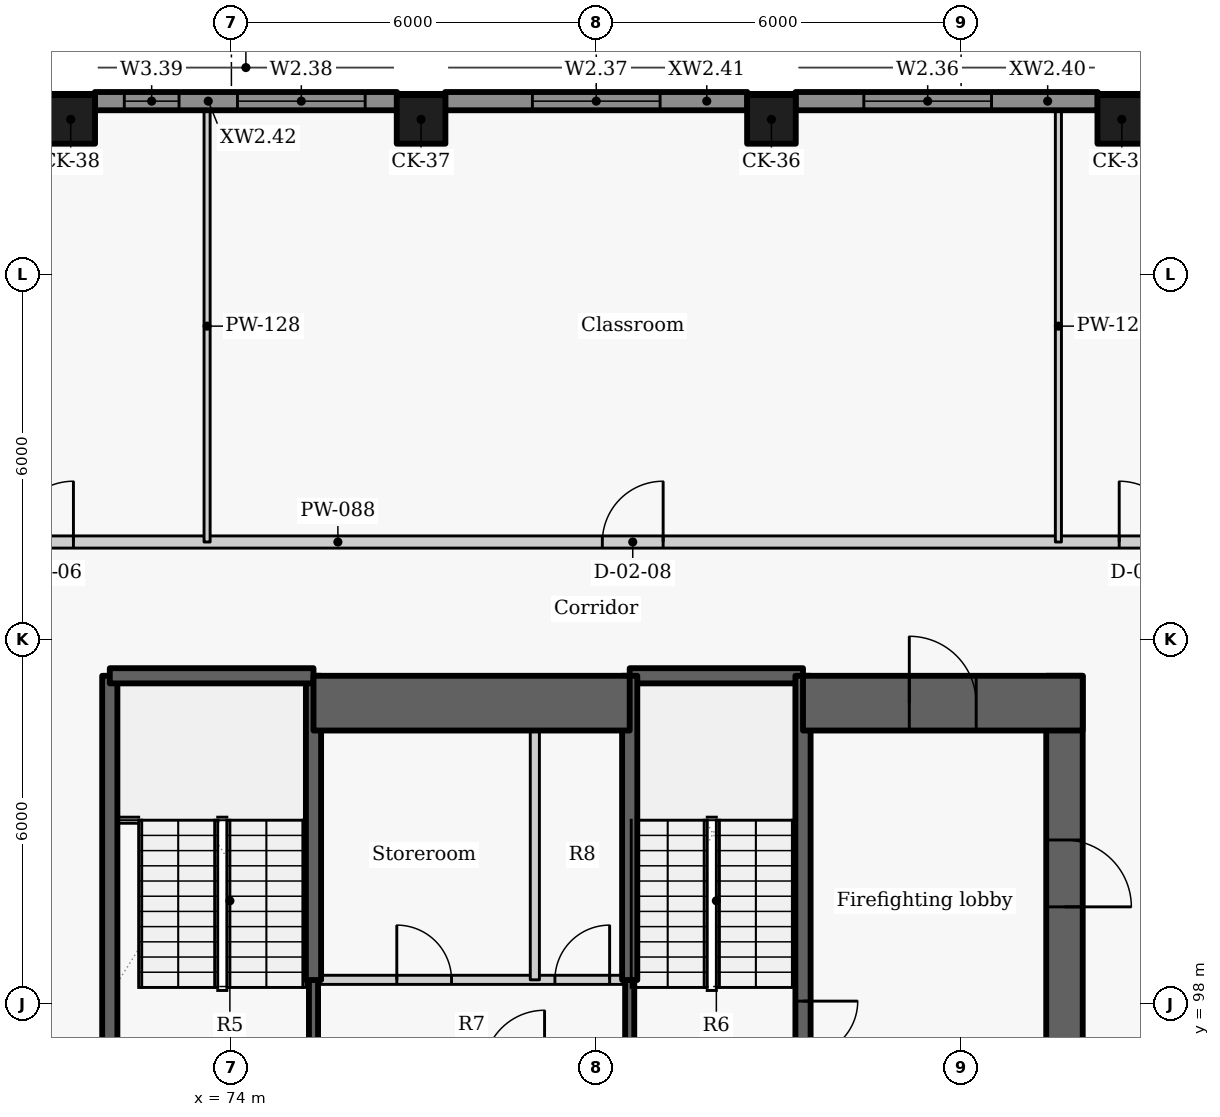
"""IFC4 building model, lengths in metres.
Left out: names, types, materials, properties, quantities, classifications, styles, units other than length and angle.
Written with IfcOpenShell. Run it as: python <this file> out.ifc"""

import sys

from ifc_helpers import new_model, si_unit, direction, frame, frame_2d, origin, origin_2d, place, context, subcontext, project, spatial, rectangle, extrude, element, fill, save


model = new_model("IFC4")
c1 = context("Model", 3, precision=1e-05, world=origin(), true_north=direction((0.0, 1.0)))
c2 = subcontext(c1, "Body", "Model", "MODEL_VIEW")
j1 = project(units=[si_unit("LENGTHUNIT", "METRE"), si_unit("PLANEANGLEUNIT", "RADIAN")], contexts=[c1])
p1 = place(None, origin())
s1 = spatial("IfcSite", under=j1, at=p1, CompositionType="ELEMENT")
p2 = place(p1, origin())
s2 = spatial("IfcBuilding", under=s1, at=p2, CompositionType="ELEMENT")
p3 = place(p2, frame((0.0, 0.0, 19.8)))
s3 = spatial("IfcBuildingStorey", under=s2, at=p3, CompositionType="ELEMENT", Elevation=19.8)
for number, where, z_axis, x_axis in (
    (1, (88.643, 112.55, 0.0), (0.0, 0.0, 1.0), (-1.0, 0.0, 0.0)),
    (2, (82.881, 112.55, 0.0), (0.0, 0.0, 1.0), (-1.0, 0.0, 0.0)),
    (3, (77.119, 112.55, 0.0), (0.0, 0.0, 1.0), (-1.0, 0.0, 0.0)),
    (4, (71.357, 112.55, 0.0), (0.0, 0.0, 1.0), (-1.0, 0.0, 0.0)),
):
    element("IfcColumn", number, at=place(p3, frame(where, z_axis=z_axis, x_axis=x_axis)), inside=s3, PredefinedType="COLUMN", context=c2, shape_type="SweptSolid", body=[
        extrude(rectangle(XDim=0.8, YDim=0.8, at=origin_2d()), origin(), (0.0, 0.0, 1.0), 4.2),
    ])
p4 = place(p3, frame((88.247, 112.85, 0.0), z_axis=(0.0, 0.0, 1.0), x_axis=(-1.0, 0.0, 0.0)))
e5 = element("IfcWall", 5, at=p4, inside=s3, PredefinedType="SOLIDWALL", context=c2, shape_type="SweptSolid", body=[
    extrude(rectangle(XDim=4.97, YDim=0.3, at=frame_2d((2.485, 0.0))), origin(), (0.0, 0.0, 1.0), 3.0),
])
p5 = place(p4, frame((1.746, 0.0, 0.9)))
e6 = element("IfcOpeningElement", 6, at=p5, cuts=e5, PredefinedType="OPENING", context=c2, shape_type="SweptSolid", body=[
    extrude(rectangle(XDim=2.1, YDim=2.05, at=frame_2d((1.05, 1.025))), frame((0.0, 0.16, 0.0), z_axis=(0.0, -1.0, 0.0), x_axis=(1.0, 0.0, 0.0)), (0.0, 0.0, 1.0), 0.32),
])
p6 = place(p3, frame((82.485, 112.85, 0.0), z_axis=(0.0, 0.0, 1.0), x_axis=(-1.0, 0.0, 0.0)))
e7 = element("IfcWall", 7, at=p6, inside=s3, PredefinedType="SOLIDWALL", context=c2, shape_type="SweptSolid", body=[
    extrude(rectangle(XDim=4.97, YDim=0.3, at=frame_2d((2.485, 0.0))), origin(), (0.0, 0.0, 1.0), 3.0),
])
p7 = place(p6, frame((1.435, 0.0, 0.9)))
e8 = element("IfcOpeningElement", 8, at=p7, cuts=e7, PredefinedType="OPENING", context=c2, shape_type="SweptSolid", body=[
    extrude(rectangle(XDim=2.1, YDim=2.05, at=frame_2d((1.05, 1.025))), frame((0.0, 0.16, 0.0), z_axis=(0.0, -1.0, 0.0), x_axis=(1.0, 0.0, 0.0)), (0.0, 0.0, 1.0), 0.32),
])
p8 = place(p3, frame((76.723, 112.85, 0.0), z_axis=(0.0, 0.0, 1.0), x_axis=(-1.0, 0.0, 0.0)))
e9 = element("IfcWall", 9, at=p8, inside=s3, PredefinedType="SOLIDWALL", context=c2, shape_type="SweptSolid", body=[
    extrude(rectangle(XDim=4.97, YDim=0.3, at=frame_2d((2.485, 0.0))), origin(), (0.0, 0.0, 1.0), 3.0),
])
p9 = place(p8, frame((0.523, 0.0, 0.9)))
e10 = element("IfcOpeningElement", 10, at=p9, cuts=e9, PredefinedType="OPENING", context=c2, shape_type="SweptSolid", body=[
    extrude(rectangle(XDim=2.1, YDim=2.05, at=frame_2d((1.05, 1.025))), frame((0.0, 0.16, 0.0), z_axis=(0.0, -1.0, 0.0), x_axis=(1.0, 0.0, 0.0)), (0.0, 0.0, 1.0), 0.32),
])
p10 = place(p8, frame((3.584, 0.0, 1.5)))
e11 = element("IfcOpeningElement", 11, at=p10, cuts=e9, PredefinedType="OPENING", context=c2, shape_type="SweptSolid", body=[
    extrude(rectangle(XDim=0.9, YDim=1.45, at=frame_2d((0.45, 0.725))), frame((0.0, 0.16, 0.0), z_axis=(0.0, -1.0, 0.0), x_axis=(1.0, 0.0, 0.0)), (0.0, 0.0, 1.0), 0.32),
])
p11 = place(p3, frame((87.7, 103.4, -0.3), z_axis=(0.0, 0.0, 1.0), x_axis=(0.0, -1.0, 0.0)))
e12 = element("IfcWall", 12, at=p11, inside=s3, PredefinedType="SHEAR", context=c2, shape_type="SweptSolid", body=[
    extrude(rectangle(XDim=15.6, YDim=0.6, at=frame_2d((7.8, 0.0))), origin(), (0.0, 0.0, 1.0), 4.2),
])
p12 = place(p11, frame((2.7, 0.0, 0.3)))
e13 = element("IfcOpeningElement", 13, at=p12, cuts=e12, PredefinedType="OPENING", context=c2, shape_type="SweptSolid", body=[
    extrude(rectangle(XDim=1.1, YDim=2.1, at=frame_2d((0.55, 1.05))), frame((0.0, 0.31, 0.0), z_axis=(0.0, -1.0, 0.0), x_axis=(1.0, 0.0, 0.0)), (0.0, 0.0, 1.0), 0.62),
])
p13 = place(p3, frame((75.35, 96.9, -0.3), z_axis=(0.0, 0.0, 1.0), x_axis=(0.0, 1.0, 0.0)))
e14 = element("IfcWall", 14, at=p13, inside=s3, PredefinedType="SHEAR", context=c2, shape_type="SweptSolid", body=[
    extrude(rectangle(XDim=1.503, YDim=0.15, at=frame_2d((0.751, 0.0))), origin(), (0.0, 0.0, 1.0), 4.2),
])
p14 = place(p3, frame((75.35, 98.397, -0.3), z_axis=(0.0, 0.0, 1.0), x_axis=(0.0, 1.0, 0.0)))
e15 = element("IfcWall", 15, at=p14, inside=s3, PredefinedType="SHEAR", context=c2, shape_type="SweptSolid", body=[
    extrude(rectangle(XDim=5.003, YDim=0.25, at=frame_2d((2.501, 0.0))), origin(), (0.0, 0.0, 1.0), 4.2),
])
p15 = place(p3, frame((72.0, 96.9, -0.3), z_axis=(0.0, 0.0, 1.0), x_axis=(0.0, 1.0, 0.0)))
e16 = element("IfcWall", 16, at=p15, inside=s3, PredefinedType="SHEAR", context=c2, shape_type="SweptSolid", body=[
    extrude(rectangle(XDim=6.5, YDim=0.25, at=frame_2d((3.25, 0.0))), origin(), (0.0, 0.0, 1.0), 4.2),
])
p16 = place(p3, frame((72.0, 103.4, -0.3), z_axis=(0.0, 0.0, 1.0), x_axis=(1.0, 0.0, 0.0)))
e17 = element("IfcWall", 17, at=p16, inside=s3, PredefinedType="SHEAR", context=c2, shape_type="SweptSolid", body=[
    extrude(rectangle(XDim=3.35, YDim=0.25, at=frame_2d((1.675, 0.0))), origin(), (0.0, 0.0, 1.0), 4.2),
])
p17 = place(p3, frame((80.55, 103.4, -0.3), z_axis=(0.0, 0.0, 1.0), x_axis=(1.0, 0.0, 0.0)))
e18 = element("IfcWall", 18, at=p17, inside=s3, PredefinedType="SHEAR", context=c2, shape_type="SweptSolid", body=[
    extrude(rectangle(XDim=2.85, YDim=0.25, at=frame_2d((1.425, 0.0))), origin(), (0.0, 0.0, 1.0), 4.2),
])
p18 = place(p3, frame((83.4, 103.4, -0.3), z_axis=(0.0, 0.0, 1.0), x_axis=(0.0, -1.0, 0.0)))
e19 = element("IfcWall", 19, at=p18, inside=s3, PredefinedType="SHEAR", context=c2, shape_type="SweptSolid", body=[
    extrude(rectangle(XDim=6.5, YDim=0.25, at=frame_2d((3.25, 0.0))), origin(), (0.0, 0.0, 1.0), 4.2),
])
p19 = place(p18, frame((5.35, 0.0, 0.3)))
e20 = element("IfcOpeningElement", 20, at=p19, cuts=e19, PredefinedType="OPENING", context=c2, shape_type="SweptSolid", body=[
    extrude(rectangle(XDim=0.9, YDim=2.1, at=frame_2d((0.45, 1.05))), frame((0.0, 0.135, 0.0), z_axis=(0.0, -1.0, 0.0), x_axis=(1.0, 0.0, 0.0)), (0.0, 0.0, 1.0), 0.27),
])
p20 = place(p3, frame((80.55, 96.9, -0.3), z_axis=(0.0, 0.0, 1.0), x_axis=(0.0, 1.0, 0.0)))
e21 = element("IfcWall", 21, at=p20, inside=s3, PredefinedType="SHEAR", context=c2, shape_type="SweptSolid", body=[
    extrude(rectangle(XDim=1.503, YDim=0.15, at=frame_2d((0.751, 0.0))), origin(), (0.0, 0.0, 1.0), 4.2),
])
p21 = place(p3, frame((80.55, 98.397, -0.3), z_axis=(0.0, 0.0, 1.0), x_axis=(0.0, 1.0, 0.0)))
e22 = element("IfcWall", 22, at=p21, inside=s3, PredefinedType="SHEAR", context=c2, shape_type="SweptSolid", body=[
    extrude(rectangle(XDim=5.003, YDim=0.25, at=frame_2d((2.501, 0.0))), origin(), (0.0, 0.0, 1.0), 4.2),
])
p22 = place(p3, frame((75.35, 102.95, -0.3), z_axis=(0.0, 0.0, 1.0), x_axis=(1.0, 0.0, 0.0)))
e23 = element("IfcWall", 23, at=p22, inside=s3, PredefinedType="SHEAR", context=c2, shape_type="SweptSolid", body=[
    extrude(rectangle(XDim=5.2, YDim=0.9, at=frame_2d((2.6, 0.0))), origin(), (0.0, 0.0, 1.0), 4.2),
])
p23 = place(p3, frame((83.4, 102.95, -0.3), z_axis=(0.0, 0.0, 1.0), x_axis=(1.0, 0.0, 0.0)))
e24 = element("IfcWall", 24, at=p23, inside=s3, PredefinedType="SHEAR", context=c2, shape_type="SweptSolid", body=[
    extrude(rectangle(XDim=4.6, YDim=0.9, at=frame_2d((2.3, 0.0))), origin(), (0.0, 0.0, 1.0), 4.2),
])
p24 = place(p23, frame((1.748, 0.0, 0.3)))
e25 = element("IfcOpeningElement", 25, at=p24, cuts=e24, PredefinedType="OPENING", context=c2, shape_type="SweptSolid", body=[
    extrude(rectangle(XDim=1.1, YDim=2.1, at=frame_2d((0.55, 1.05))), frame((0.0, 0.46, 0.0), z_axis=(0.0, -1.0, 0.0), x_axis=(1.0, 0.0, 0.0)), (0.0, 0.0, 1.0), 0.92),
])
p25 = place(p3, frame((75.35, 98.4, 0.0), z_axis=(0.0, 0.0, 1.0), x_axis=(1.0, 0.0, 0.0)))
e26 = element("IfcWall", 26, at=p25, inside=s3, PredefinedType="PARTITIONING", context=c2, shape_type="SweptSolid", body=[
    extrude(rectangle(XDim=5.2, YDim=0.15, at=frame_2d((2.6, 0.0))), origin(), (0.0, 0.0, 1.0), 3.9),
])
p26 = place(p25, frame((1.37, 0.0, 0.0)))
e27 = element("IfcOpeningElement", 27, at=p26, cuts=e26, PredefinedType="OPENING", context=c2, shape_type="SweptSolid", body=[
    extrude(rectangle(XDim=0.9, YDim=2.1, at=frame_2d((0.45, 1.05))), frame((0.0, 0.085, 0.0), z_axis=(0.0, -1.0, 0.0), x_axis=(1.0, 0.0, 0.0)), (0.0, 0.0, 1.0), 0.17),
])
p27 = place(p25, frame((3.97, 0.0, 0.0)))
e28 = element("IfcOpeningElement", 28, at=p27, cuts=e26, PredefinedType="OPENING", context=c2, shape_type="SweptSolid", body=[
    extrude(rectangle(XDim=0.9, YDim=2.1, at=frame_2d((0.45, 1.05))), frame((0.0, 0.085, 0.0), z_axis=(0.0, -1.0, 0.0), x_axis=(1.0, 0.0, 0.0)), (0.0, 0.0, 1.0), 0.17),
])
p28 = place(p3, frame((78.99, 98.4, 0.0), z_axis=(0.0, 0.0, 1.0), x_axis=(0.0, 1.0, 0.0)))
e29 = element("IfcWall", 29, at=p28, inside=s3, PredefinedType="PARTITIONING", context=c2, shape_type="SweptSolid", body=[
    extrude(rectangle(XDim=5.0, YDim=0.15, at=frame_2d((2.5, 0.0))), origin(), (0.0, 0.0, 1.0), 3.9),
])
p29 = place(p3, frame((69.8, 105.6, 0.0), z_axis=(0.0, 0.0, 1.0), x_axis=(1.0, 0.0, 0.0)))
e30 = element("IfcWall", 30, at=p29, inside=s3, PredefinedType="PARTITIONING", context=c2, shape_type="SweptSolid", body=[
    extrude(rectangle(XDim=20.4, YDim=0.2, at=frame_2d((10.2, 0.0))), origin(), (0.0, 0.0, 1.0), 3.9),
])
p30 = place(p29, frame((0.602, 0.0, 0.0)))
e31 = element("IfcOpeningElement", 31, at=p30, cuts=e30, PredefinedType="OPENING", context=c2, shape_type="SweptSolid", body=[
    extrude(rectangle(XDim=1.0, YDim=2.1, at=frame_2d((0.5, 1.05))), frame((0.0, 0.11, 0.0), z_axis=(0.0, -1.0, 0.0), x_axis=(1.0, 0.0, 0.0)), (0.0, 0.0, 1.0), 0.22),
])
p31 = place(p29, frame((18.8, 0.0, 0.0)))
e32 = element("IfcOpeningElement", 32, at=p31, cuts=e30, PredefinedType="OPENING", context=c2, shape_type="SweptSolid", body=[
    extrude(rectangle(XDim=1.0, YDim=2.1, at=frame_2d((0.5, 1.05))), frame((0.0, 0.11, 0.0), z_axis=(0.0, -1.0, 0.0), x_axis=(1.0, 0.0, 0.0)), (0.0, 0.0, 1.0), 0.22),
])
p32 = place(p29, frame((10.3, 0.0, 0.0)))
e33 = element("IfcOpeningElement", 33, at=p32, cuts=e30, PredefinedType="OPENING", context=c2, shape_type="SweptSolid", body=[
    extrude(rectangle(XDim=1.0, YDim=2.1, at=frame_2d((0.5, 1.05))), frame((0.0, 0.11, 0.0), z_axis=(0.0, -1.0, 0.0), x_axis=(1.0, 0.0, 0.0)), (0.0, 0.0, 1.0), 0.22),
])
for number, where, z_axis, x_axis in (
    (34, (73.6, 105.6, 0.0), (0.0, 0.0, 1.0), (0.0, 1.0, 0.0)),
    (35, (87.6, 105.6, 0.0), (0.0, 0.0, 1.0), (0.0, 1.0, 0.0)),
):
    element("IfcWall", number, at=place(p3, frame(where, z_axis=z_axis, x_axis=x_axis)), inside=s3, PredefinedType="PARTITIONING", context=c2, shape_type="SweptSolid", body=[
        extrude(rectangle(XDim=7.1, YDim=0.1, at=frame_2d((3.55, 0.0))), origin(), (0.0, 0.0, 1.0), 3.13),
    ])
p33 = place(p5, origin())
e36 = element("IfcWindow", 36, at=p33, inside=s3, PartitioningType="SINGLE_PANEL", PredefinedType="WINDOW", context=c2, shape_type="SweptSolid", body=[
    extrude(rectangle(XDim=2.1, YDim=2.05, at=frame_2d((1.05, 1.025))), frame((0.0, 0.03, 0.0), z_axis=(0.0, -1.0, 0.0), x_axis=(1.0, 0.0, 0.0)), (0.0, 0.0, 1.0), 0.06),
])
fill(e6, e36)
p34 = place(p7, origin())
e37 = element("IfcWindow", 37, at=p34, inside=s3, PartitioningType="SINGLE_PANEL", PredefinedType="WINDOW", context=c2, shape_type="SweptSolid", body=[
    extrude(rectangle(XDim=2.1, YDim=2.05, at=frame_2d((1.05, 1.025))), frame((0.0, 0.03, 0.0), z_axis=(0.0, -1.0, 0.0), x_axis=(1.0, 0.0, 0.0)), (0.0, 0.0, 1.0), 0.06),
])
fill(e8, e37)
p35 = place(p9, origin())
e38 = element("IfcWindow", 38, at=p35, inside=s3, PartitioningType="SINGLE_PANEL", PredefinedType="WINDOW", context=c2, shape_type="SweptSolid", body=[
    extrude(rectangle(XDim=2.1, YDim=2.05, at=frame_2d((1.05, 1.025))), frame((0.0, 0.03, 0.0), z_axis=(0.0, -1.0, 0.0), x_axis=(1.0, 0.0, 0.0)), (0.0, 0.0, 1.0), 0.06),
])
fill(e10, e38)
p36 = place(p10, origin())
e39 = element("IfcWindow", 39, at=p36, inside=s3, PartitioningType="SINGLE_PANEL", PredefinedType="WINDOW", context=c2, shape_type="SweptSolid", body=[
    extrude(rectangle(XDim=0.9, YDim=1.45, at=frame_2d((0.45, 0.725))), frame((0.0, 0.03, 0.0), z_axis=(0.0, -1.0, 0.0), x_axis=(1.0, 0.0, 0.0)), (0.0, 0.0, 1.0), 0.06),
])
fill(e11, e39)
p37 = place(p26, origin())
e40 = element("IfcDoor", 40, at=p37, inside=s3, OperationType="SINGLE_SWING_LEFT", PredefinedType="DOOR", context=c2, shape_type="SweptSolid", body=[
    extrude(rectangle(XDim=0.9, YDim=2.1, at=frame_2d((0.45, 1.05))), frame((0.0, 0.025, 0.0), z_axis=(0.0, -1.0, 0.0), x_axis=(1.0, 0.0, 0.0)), (0.0, 0.0, 1.0), 0.05),
])
fill(e27, e40)
p38 = place(p27, origin())
e41 = element("IfcDoor", 41, at=p38, inside=s3, OperationType="SINGLE_SWING_RIGHT", PredefinedType="DOOR", context=c2, shape_type="SweptSolid", body=[
    extrude(rectangle(XDim=0.9, YDim=2.1, at=frame_2d((0.45, 1.05))), frame((0.0, 0.025, 0.0), z_axis=(0.0, -1.0, 0.0), x_axis=(1.0, 0.0, 0.0)), (0.0, 0.0, 1.0), 0.05),
])
fill(e28, e41)
p39 = place(p19, origin())
e42 = element("IfcDoor", 42, at=p39, inside=s3, OperationType="SINGLE_SWING_LEFT", PredefinedType="DOOR", context=c2, shape_type="SweptSolid", body=[
    extrude(rectangle(XDim=0.9, YDim=2.1, at=frame_2d((0.45, 1.05))), frame((0.0, 0.025, 0.0), z_axis=(0.0, -1.0, 0.0), x_axis=(1.0, 0.0, 0.0)), (0.0, 0.0, 1.0), 0.05),
])
fill(e20, e42)
p40 = place(p30, origin())
e43 = element("IfcDoor", 43, at=p40, inside=s3, OperationType="SINGLE_SWING_RIGHT", PredefinedType="DOOR", context=c2, shape_type="SweptSolid", body=[
    extrude(rectangle(XDim=1.0, YDim=2.1, at=frame_2d((0.5, 1.05))), frame((0.0, 0.025, 0.0), z_axis=(0.0, -1.0, 0.0), x_axis=(1.0, 0.0, 0.0)), (0.0, 0.0, 1.0), 0.05),
])
fill(e31, e43)
p41 = place(p31, origin())
e44 = element("IfcDoor", 44, at=p41, inside=s3, OperationType="SINGLE_SWING_LEFT", PredefinedType="DOOR", context=c2, shape_type="SweptSolid", body=[
    extrude(rectangle(XDim=1.0, YDim=2.1, at=frame_2d((0.5, 1.05))), frame((0.0, 0.025, 0.0), z_axis=(0.0, -1.0, 0.0), x_axis=(1.0, 0.0, 0.0)), (0.0, 0.0, 1.0), 0.05),
])
fill(e32, e44)
p42 = place(p32, origin())
e45 = element("IfcDoor", 45, at=p42, inside=s3, OperationType="SINGLE_SWING_RIGHT", PredefinedType="DOOR", context=c2, shape_type="SweptSolid", body=[
    extrude(rectangle(XDim=1.0, YDim=2.1, at=frame_2d((0.5, 1.05))), frame((0.0, 0.025, 0.0), z_axis=(0.0, -1.0, 0.0), x_axis=(1.0, 0.0, 0.0)), (0.0, 0.0, 1.0), 0.05),
])
fill(e33, e45)
p43 = place(p12, origin())
e46 = element("IfcDoor", 46, at=p43, inside=s3, OperationType="SINGLE_SWING_RIGHT", PredefinedType="DOOR", context=c2, shape_type="SweptSolid", body=[
    extrude(rectangle(XDim=1.1, YDim=2.1, at=frame_2d((0.55, 1.05))), frame((0.0, 0.025, 0.0), z_axis=(0.0, -1.0, 0.0), x_axis=(1.0, 0.0, 0.0)), (0.0, 0.0, 1.0), 0.05),
])
fill(e13, e46)
p44 = place(p24, origin())
e47 = element("IfcDoor", 47, at=p44, inside=s3, OperationType="SINGLE_SWING_LEFT", PredefinedType="DOOR", context=c2, shape_type="SweptSolid", body=[
    extrude(rectangle(XDim=1.1, YDim=2.1, at=frame_2d((0.55, 1.05))), frame((0.0, 0.025, 0.0), z_axis=(0.0, -1.0, 0.0), x_axis=(1.0, 0.0, 0.0)), (0.0, 0.0, 1.0), 0.05),
])
fill(e25, e47)
save(model, sys.argv[1])
